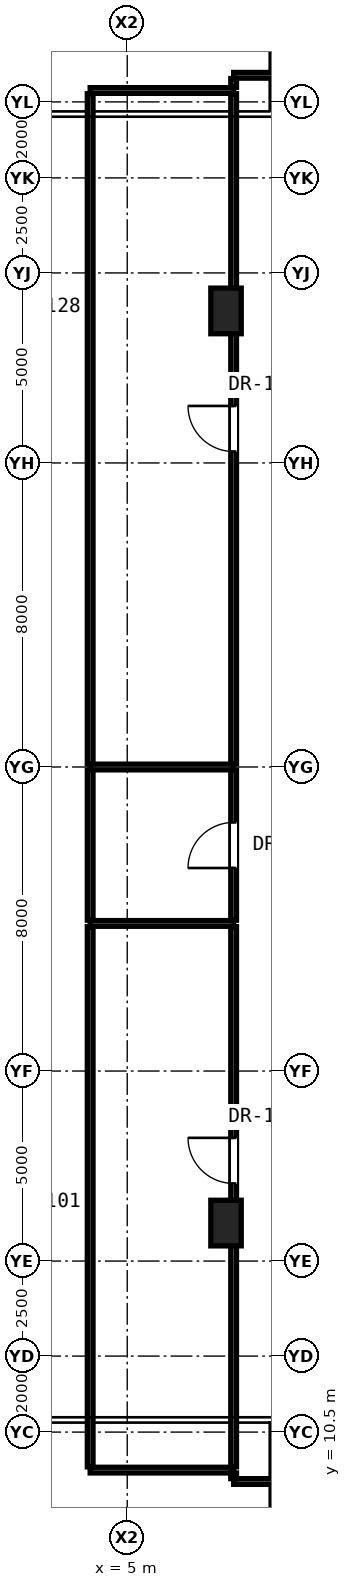
"""IFC4 building model, lengths in metres.
Left out: names, types, materials, properties, quantities, classifications, styles, units other than length and angle.
Written with IfcOpenShell. Run it as: python <this file> out.ifc"""

import sys

from ifc_helpers import new_model, si_unit, direction, frame, frame_2d, origin, origin_2d, place, context, subcontext, project, spatial, rectangle, extrude, element, fill, save


model = new_model("IFC4")
c1 = context("Model", 3, precision=1e-05, world=origin(), true_north=direction((0.0, 1.0)))
c2 = subcontext(c1, "Body", "Model", "MODEL_VIEW")
j1 = project(units=[si_unit("LENGTHUNIT", "METRE"), si_unit("PLANEANGLEUNIT", "RADIAN")], contexts=[c1])
p1 = place(None, origin())
s1 = spatial("IfcSite", under=j1, at=p1, CompositionType="ELEMENT")
p2 = place(p1, origin())
s2 = spatial("IfcBuilding", under=s1, at=p2, CompositionType="ELEMENT")
p3 = place(p2, frame((0.0, 0.0, 13.8)))
s3 = spatial("IfcBuildingStorey", under=s2, at=p3, CompositionType="ELEMENT", Elevation=13.8)
for number, where, z_axis, x_axis in (
    (1, (7.6, 16.0, 0.0), (0.0, 0.0, 1.0), (1.0, 0.0, 0.0)),
    (2, (7.6, 40.0, 0.0), (0.0, 0.0, 1.0), (1.0, 0.0, 0.0)),
):
    element("IfcColumn", number, at=place(p3, frame(where, z_axis=z_axis, x_axis=x_axis)), inside=s3, PredefinedType="PILASTER", context=c2, shape_type="SweptSolid", body=[
        extrude(rectangle(XDim=0.8, YDim=1.2, at=origin_2d()), origin(), (0.0, 0.0, 1.0), 4.3),
    ])
p4 = place(p3, frame((7.8, 9.2, 0.0), z_axis=(0.0, 0.0, 1.0), x_axis=(1.0, 0.0, 0.0)))
e3 = element("IfcWall", 3, at=p4, inside=s3, PredefinedType="PARTITIONING", context=c2, shape_type="SweptSolid", body=[
    extrude(rectangle(XDim=2.25, YDim=0.15, at=frame_2d((1.125, 0.0))), origin(), (0.0, 0.0, 1.0), 3.65),
])
for number, where, z_axis, x_axis in (
    (4, (4.025, 9.5, 0.0), (0.0, 0.0, 1.0), (1.0, 0.0, 0.0)),
    (5, (4.025, 23.884, 0.0), (0.0, 0.0, 1.0), (1.0, 0.0, 0.0)),
    (6, (4.025, 28.0, 0.0), (0.0, 0.0, 1.0), (1.0, 0.0, 0.0)),
    (7, (4.025, 45.8, 0.0), (0.0, 0.0, 1.0), (1.0, 0.0, 0.0)),
):
    element("IfcWall", number, at=place(p3, frame(where, z_axis=z_axis, x_axis=x_axis)), inside=s3, PredefinedType="PARTITIONING", context=c2, shape_type="SweptSolid", body=[
        extrude(rectangle(XDim=3.775, YDim=0.15, at=frame_2d((1.888, 0.0))), origin(), (0.0, 0.0, 1.0), 3.65),
    ])
p5 = place(p3, frame((7.8, 46.2, 0.0), z_axis=(0.0, 0.0, 1.0), x_axis=(1.0, 0.0, 0.0)))
e8 = element("IfcWall", 8, at=p5, inside=s3, PredefinedType="PARTITIONING", context=c2, shape_type="SweptSolid", body=[
    extrude(rectangle(XDim=2.25, YDim=0.15, at=frame_2d((1.125, 0.0))), origin(), (0.0, 0.0, 1.0), 3.65),
])
p6 = place(p3, frame((4.025, 9.585, 0.0), z_axis=(0.0, 0.0, 1.0), x_axis=(0.0, 1.0, 0.0)))
e9 = element("IfcWall", 9, at=p6, inside=s3, PredefinedType="PARTITIONING", context=c2, shape_type="SweptSolid", body=[
    extrude(rectangle(XDim=14.214, YDim=0.15, at=frame_2d((7.107, 0.0))), origin(), (0.0, 0.0, 1.0), 2.542),
])
p7 = place(p3, frame((4.025, 23.969, 0.0), z_axis=(0.0, 0.0, 1.0), x_axis=(0.0, 1.0, 0.0)))
e10 = element("IfcWall", 10, at=p7, inside=s3, PredefinedType="PARTITIONING", context=c2, shape_type="SweptSolid", body=[
    extrude(rectangle(XDim=3.946, YDim=0.15, at=frame_2d((1.973, 0.0))), origin(), (0.0, 0.0, 1.0), 2.869),
])
p8 = place(p3, frame((4.025, 28.085, 0.0), z_axis=(0.0, 0.0, 1.0), x_axis=(0.0, 1.0, 0.0)))
e11 = element("IfcWall", 11, at=p8, inside=s3, PredefinedType="PARTITIONING", context=c2, shape_type="SweptSolid", body=[
    extrude(rectangle(XDim=17.63, YDim=0.15, at=frame_2d((8.815, 0.0))), origin(), (0.0, 0.0, 1.0), 2.542),
])
p9 = place(p3, frame((7.8, 9.275, 0.0), z_axis=(0.0, 0.0, 1.0), x_axis=(0.0, 1.0, 0.0)))
e12 = element("IfcWall", 12, at=p9, inside=s3, PredefinedType="PARTITIONING", context=c2, shape_type="SweptSolid", body=[
    extrude(rectangle(XDim=0.15, YDim=0.15, at=frame_2d((0.075, 0.0))), origin(), (0.0, 0.0, 1.0), 3.65),
])
p10 = place(p3, frame((7.8, 9.585, 0.0), z_axis=(0.0, 0.0, 1.0), x_axis=(0.0, 1.0, 0.0)))
e13 = element("IfcWall", 13, at=p10, inside=s3, PredefinedType="PARTITIONING", context=c2, shape_type="SweptSolid", body=[
    extrude(rectangle(XDim=14.214, YDim=0.15, at=frame_2d((7.107, 0.0))), origin(), (0.0, 0.0, 1.0), 2.542),
])
p11 = place(p10, frame((7.457, 0.0, 0.0)))
e14 = element("IfcOpeningElement", 14, at=p11, cuts=e13, PredefinedType="OPENING", context=c2, shape_type="SweptSolid", body=[
    extrude(rectangle(XDim=1.2, YDim=2.25, at=frame_2d((0.6, 1.125))), frame((0.0, 0.085, 0.0), z_axis=(0.0, -1.0, 0.0), x_axis=(1.0, 0.0, 0.0)), (0.0, 0.0, 1.0), 0.17),
])
p12 = place(p3, frame((7.8, 23.969, 0.0), z_axis=(0.0, 0.0, 1.0), x_axis=(0.0, 1.0, 0.0)))
e15 = element("IfcWall", 15, at=p12, inside=s3, PredefinedType="PARTITIONING", context=c2, shape_type="SweptSolid", body=[
    extrude(rectangle(XDim=3.946, YDim=0.15, at=frame_2d((1.973, 0.0))), origin(), (0.0, 0.0, 1.0), 2.869),
])
p13 = place(p12, frame((1.373, 0.0, 0.0)))
e16 = element("IfcOpeningElement", 16, at=p13, cuts=e15, PredefinedType="OPENING", context=c2, shape_type="SweptSolid", body=[
    extrude(rectangle(XDim=1.2, YDim=2.25, at=frame_2d((0.6, 1.125))), frame((0.0, 0.085, 0.0), z_axis=(0.0, -1.0, 0.0), x_axis=(1.0, 0.0, 0.0)), (0.0, 0.0, 1.0), 0.17),
])
p14 = place(p3, frame((7.8, 28.085, 0.0), z_axis=(0.0, 0.0, 1.0), x_axis=(0.0, 1.0, 0.0)))
e17 = element("IfcWall", 17, at=p14, inside=s3, PredefinedType="PARTITIONING", context=c2, shape_type="SweptSolid", body=[
    extrude(rectangle(XDim=17.63, YDim=0.15, at=frame_2d((8.815, 0.0))), origin(), (0.0, 0.0, 1.0), 2.542),
])
p15 = place(p14, frame((8.215, 0.0, 0.0)))
e18 = element("IfcOpeningElement", 18, at=p15, cuts=e17, PredefinedType="OPENING", context=c2, shape_type="SweptSolid", body=[
    extrude(rectangle(XDim=1.2, YDim=2.25, at=frame_2d((0.6, 1.125))), frame((0.0, 0.085, 0.0), z_axis=(0.0, -1.0, 0.0), x_axis=(1.0, 0.0, 0.0)), (0.0, 0.0, 1.0), 0.17),
])
p16 = place(p3, frame((7.8, 45.885, 0.0), z_axis=(0.0, 0.0, 1.0), x_axis=(0.0, 1.0, 0.0)))
e19 = element("IfcWall", 19, at=p16, inside=s3, PredefinedType="PARTITIONING", context=c2, shape_type="SweptSolid", body=[
    extrude(rectangle(XDim=0.23, YDim=0.15, at=frame_2d((0.115, 0.0))), origin(), (0.0, 0.0, 1.0), 3.65),
])
p17 = place(p11, origin())
e20 = element("IfcDoor", 20, at=p17, inside=s3, OperationType="SINGLE_SWING_RIGHT", PredefinedType="DOOR", context=c2, shape_type="SweptSolid", body=[
    extrude(rectangle(XDim=1.2, YDim=2.25, at=frame_2d((0.6, 1.125))), frame((0.0, 0.025, 0.0), z_axis=(0.0, -1.0, 0.0), x_axis=(1.0, 0.0, 0.0)), (0.0, 0.0, 1.0), 0.05),
])
fill(e14, e20)
p18 = place(p13, origin())
e21 = element("IfcDoor", 21, at=p18, inside=s3, OperationType="SINGLE_SWING_LEFT", PredefinedType="DOOR", context=c2, shape_type="SweptSolid", body=[
    extrude(rectangle(XDim=1.2, YDim=2.25, at=frame_2d((0.6, 1.125))), frame((0.0, 0.025, 0.0), z_axis=(0.0, -1.0, 0.0), x_axis=(1.0, 0.0, 0.0)), (0.0, 0.0, 1.0), 0.05),
])
fill(e16, e21)
p19 = place(p15, origin())
e22 = element("IfcDoor", 22, at=p19, inside=s3, OperationType="SINGLE_SWING_RIGHT", PredefinedType="DOOR", context=c2, shape_type="SweptSolid", body=[
    extrude(rectangle(XDim=1.2, YDim=2.25, at=frame_2d((0.6, 1.125))), frame((0.0, 0.025, 0.0), z_axis=(0.0, -1.0, 0.0), x_axis=(1.0, 0.0, 0.0)), (0.0, 0.0, 1.0), 0.05),
])
fill(e18, e22)
save(model, sys.argv[1])
